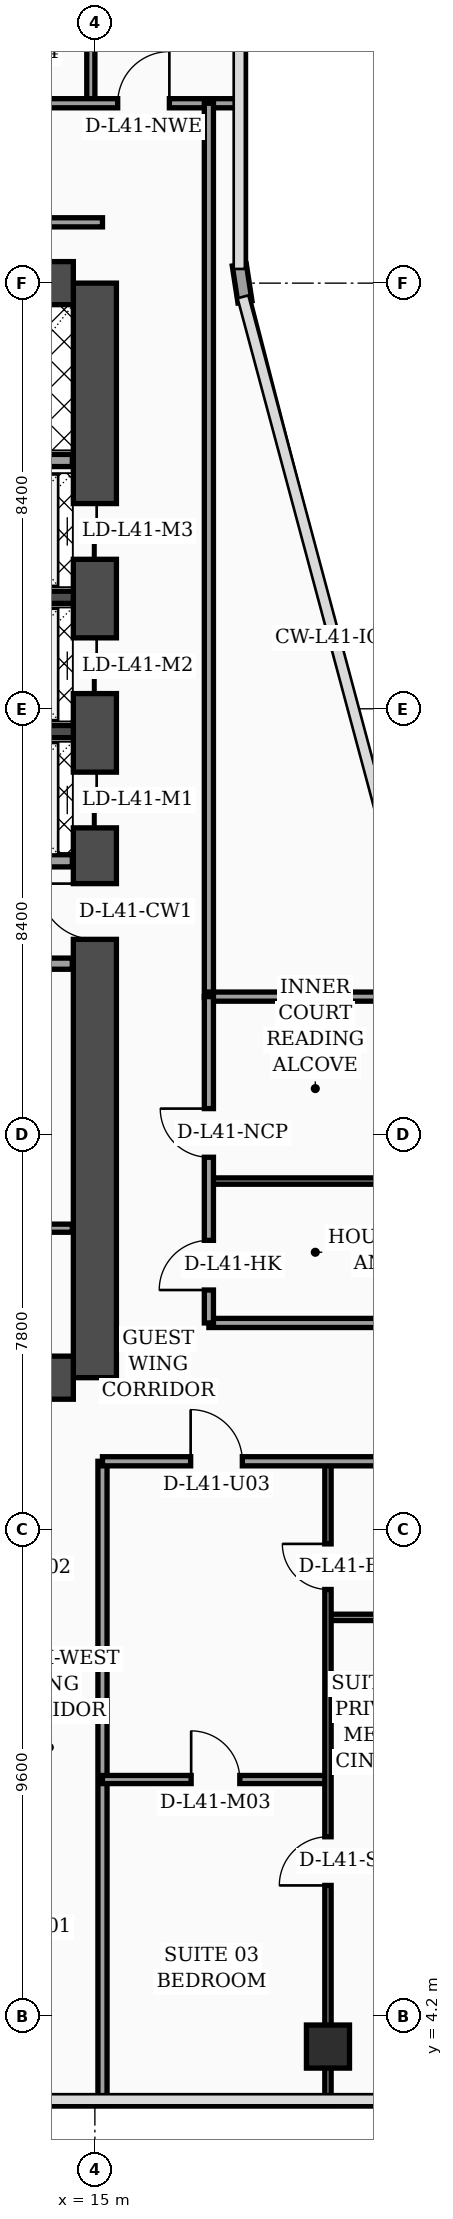
"""IFC4 building model, lengths in metres.
Left out: names, types, materials, properties, quantities, classifications, styles, units other than length and angle.
Written with IfcOpenShell. Run it as: python <this file> out.ifc"""

import sys

from ifc_helpers import new_model, si_unit, direction, frame, frame_2d, origin, origin_2d, place, context, subcontext, project, spatial, rectangle, hollow_rectangle, extrude, element, fill, save


model = new_model("IFC4")
c1 = context("Model", 3, precision=1e-05, world=origin(), true_north=direction((0.0, 1.0)))
c2 = subcontext(c1, "Body", "Model", "MODEL_VIEW")
j1 = project(units=[si_unit("LENGTHUNIT", "METRE"), si_unit("PLANEANGLEUNIT", "RADIAN")], contexts=[c1])
p1 = place(None, origin())
s1 = spatial("IfcSite", under=j1, at=p1, CompositionType="ELEMENT")
p2 = place(p1, origin())
s2 = spatial("IfcBuilding", under=s1, at=p2, CompositionType="ELEMENT")
p3 = place(p2, frame((0.0, 0.0, 167.5)))
s3 = spatial("IfcBuildingStorey", under=s2, at=p3, CompositionType="ELEMENT", Elevation=167.5)
p4 = place(p3, frame((15.0, 16.8, 0.0), z_axis=(0.0, 0.0, 1.0), x_axis=(0.0, 1.0, 0.0)))
e1 = element("IfcWall", 1, at=p4, inside=s3, PredefinedType="SHEAR", context=c2, shape_type="SweptSolid", body=[
    extrude(rectangle(XDim=21.6, YDim=0.85, at=frame_2d((10.8, 0.0))), origin(), (0.0, 0.0, 1.0), 3.56),
])
p5 = place(p4, frame((8.65, 0.0, 0.0)))
e2 = element("IfcOpeningElement", 2, at=p5, cuts=e1, PredefinedType="OPENING", context=c2, shape_type="SweptSolid", body=[
    extrude(rectangle(XDim=1.1, YDim=2.2, at=frame_2d((0.55, 1.1))), frame((0.0, 0.435, 0.0), z_axis=(0.0, -1.0, 0.0), x_axis=(1.0, 0.0, 0.0)), (0.0, 0.0, 1.0), 0.87),
])
p6 = place(p4, frame((10.85, 0.0, 0.0)))
e3 = element("IfcOpeningElement", 3, at=p6, cuts=e1, PredefinedType="OPENING", context=c2, shape_type="SweptSolid", body=[
    extrude(rectangle(XDim=1.1, YDim=2.2, at=frame_2d((0.55, 1.1))), frame((0.0, 0.435, 0.0), z_axis=(0.0, -1.0, 0.0), x_axis=(1.0, 0.0, 0.0)), (0.0, 0.0, 1.0), 0.87),
])
p7 = place(p4, frame((13.5, 0.0, 0.0)))
e4 = element("IfcOpeningElement", 4, at=p7, cuts=e1, PredefinedType="OPENING", context=c2, shape_type="SweptSolid", body=[
    extrude(rectangle(XDim=1.1, YDim=2.2, at=frame_2d((0.55, 1.1))), frame((0.0, 0.435, 0.0), z_axis=(0.0, -1.0, 0.0), x_axis=(1.0, 0.0, 0.0)), (0.0, 0.0, 1.0), 0.87),
])
p8 = place(p4, frame((16.15, 0.0, 0.0)))
e5 = element("IfcOpeningElement", 5, at=p8, cuts=e1, PredefinedType="OPENING", context=c2, shape_type="SweptSolid", body=[
    extrude(rectangle(XDim=1.1, YDim=2.2, at=frame_2d((0.55, 1.1))), frame((0.0, 0.435, 0.0), z_axis=(0.0, -1.0, 0.0), x_axis=(1.0, 0.0, 0.0)), (0.0, 0.0, 1.0), 0.87),
])
for number, where, z_axis, x_axis in (
    (6, (4.625, 38.4, 0.0), (0.0, 0.0, 1.0), (1.0, 0.0, 0.0)),
    (7, (4.625, 16.8, 0.0), (0.0, 0.0, 1.0), (1.0, 0.0, 0.0)),
):
    element("IfcWall", number, at=place(p3, frame(where, z_axis=z_axis, x_axis=x_axis)), inside=s3, PredefinedType="SHEAR", context=c2, shape_type="SweptSolid", body=[
        extrude(rectangle(XDim=9.95, YDim=0.85, at=frame_2d((4.975, 0.0))), origin(), (0.0, 0.0, 1.0), 3.56),
    ])
for number, where, z_axis, x_axis in (
    (8, (12.18, 29.55, 0.0), (0.0, 0.0, 1.0), (1.0, 0.0, 0.0)),
    (9, (12.18, 32.2, 0.0), (0.0, 0.0, 1.0), (1.0, 0.0, 0.0)),
):
    element("IfcWall", number, at=place(p3, frame(where, z_axis=z_axis, x_axis=x_axis)), inside=s3, PredefinedType="SOLIDWALL", context=c2, shape_type="SweptSolid", body=[
        extrude(rectangle(XDim=2.395, YDim=0.24, at=frame_2d((1.198, 0.0))), origin(), (0.0, 0.0, 1.0), 3.56),
    ])
p9 = place(p3, frame((19.6, 3.6, 0.0), z_axis=(0.0, 0.0, 1.0), x_axis=(1.0, 0.0, 0.0)))
e10 = element("IfcColumn", 10, at=p9, inside=s3, PredefinedType="COLUMN", context=c2, shape_type="SweptSolid", body=[
    extrude(hollow_rectangle(XDim=0.85, YDim=0.85, WallThickness=0.036, at=origin_2d()), origin(), (0.0, 0.0, 1.0), 3.56),
])
p10 = place(p3, frame((17.962, 38.03, 0.0), z_axis=(0.0, 0.0, 1.0), x_axis=(-0.15141125477, 0.988470855377, 0.0)))
e11 = element("IfcWall", 11, at=p10, inside=s3, PredefinedType="SOLIDWALL", context=c2, shape_type="SweptSolid", body=[
    extrude(rectangle(XDim=0.739, YDim=0.28, at=frame_2d((0.369, 0.0))), origin(), (0.0, 0.0, 1.0), 3.56),
])
p11 = place(p3, frame((9.68, 19.75, 0.0), z_axis=(0.0, 0.0, 1.0), x_axis=(1.0, 0.0, 0.0)))
e12 = element("IfcWall", 12, at=p11, inside=s3, PredefinedType="PARTITIONING", context=c2, shape_type="SweptSolid", body=[
    extrude(rectangle(XDim=4.875, YDim=0.16, at=frame_2d((2.438, 0.0))), origin(), (0.0, 0.0, 1.0), 3.56),
])
p12 = place(p11, frame((1.1, 0.0, 0.0)))
e13 = element("IfcOpeningElement", 13, at=p12, cuts=e12, PredefinedType="OPENING", context=c2, shape_type="SweptSolid", body=[
    extrude(rectangle(XDim=0.98, YDim=2.15, at=frame_2d((0.49, 1.075))), frame((0.0, 0.09, 0.0), z_axis=(0.0, -1.0, 0.0), x_axis=(1.0, 0.0, 0.0)), (0.0, 0.0, 1.0), 0.18),
])
p13 = place(p3, frame((9.68, 24.97, 0.0), z_axis=(0.0, 0.0, 1.0), x_axis=(1.0, 0.0, 0.0)))
e14 = element("IfcWall", 14, at=p13, inside=s3, PredefinedType="SOLIDWALL", context=c2, shape_type="SweptSolid", body=[
    extrude(rectangle(XDim=4.875, YDim=0.22, at=frame_2d((2.438, 0.0))), origin(), (0.0, 0.0, 1.0), 2.94),
])
p14 = place(p13, frame((0.9, 0.0, 0.0)))
e15 = element("IfcOpeningElement", 15, at=p14, cuts=e14, PredefinedType="OPENING", context=c2, shape_type="SweptSolid", body=[
    extrude(rectangle(XDim=0.98, YDim=2.15, at=frame_2d((0.49, 1.075))), frame((0.0, 0.12, 0.0), z_axis=(0.0, -1.0, 0.0), x_axis=(1.0, 0.0, 0.0)), (0.0, 0.0, 1.0), 0.24),
])
p15 = place(p3, frame((12.25, 27.0, 0.0), z_axis=(0.0, 0.0, 1.0), x_axis=(1.0, 0.0, 0.0)))
e16 = element("IfcWall", 16, at=p15, inside=s3, PredefinedType="SOLIDWALL", context=c2, shape_type="SweptSolid", body=[
    extrude(rectangle(XDim=2.305, YDim=0.24, at=frame_2d((1.152, 0.0))), origin(), (0.0, 0.0, 1.0), 3.56),
])
p16 = place(p3, frame((9.66, 34.9, 0.0), z_axis=(0.0, 0.0, 1.0), x_axis=(1.0, 0.0, 0.0)))
e17 = element("IfcWall", 17, at=p16, inside=s3, PredefinedType="SOLIDWALL", context=c2, shape_type="SweptSolid", body=[
    extrude(rectangle(XDim=4.895, YDim=0.24, at=frame_2d((2.448, 0.0))), origin(), (0.0, 0.0, 1.0), 3.56),
])
p17 = place(p3, frame((15.15, 2.44, 0.0), z_axis=(0.0, 0.0, 1.0), x_axis=(0.0, 1.0, 0.0)))
e18 = element("IfcWall", 18, at=p17, inside=s3, PredefinedType="PARTITIONING", context=c2, shape_type="SweptSolid", body=[
    extrude(rectangle(XDim=12.71, YDim=0.18, at=frame_2d((6.355, 0.0))), origin(), (0.0, 0.0, 1.0), 3.04),
])
p18 = place(p3, frame((19.6, 12.07, 0.0), z_axis=(0.0, 0.0, 1.0), x_axis=(1.0, 0.0, 0.0)))
e19 = element("IfcWall", 19, at=p18, inside=s3, PredefinedType="PARTITIONING", context=c2, shape_type="SweptSolid", body=[
    extrude(rectangle(XDim=2.0, YDim=0.125, at=frame_2d((1.0, 0.0))), origin(), (0.0, 0.0, 1.0), 3.56),
])
p19 = place(p3, frame((15.15, 8.87, 0.0), z_axis=(0.0, 0.0, 1.0), x_axis=(1.0, 0.0, 0.0)))
e20 = element("IfcWall", 20, at=p19, inside=s3, PredefinedType="PARTITIONING", context=c2, shape_type="SweptSolid", body=[
    extrude(rectangle(XDim=4.45, YDim=0.16, at=frame_2d((2.225, 0.0))), origin(), (0.0, 0.0, 1.0), 3.56),
])
p20 = place(p19, frame((1.75, 0.0, 0.0)))
e21 = element("IfcOpeningElement", 21, at=p20, cuts=e20, PredefinedType="OPENING", context=c2, shape_type="SweptSolid", body=[
    extrude(rectangle(XDim=0.96, YDim=2.2, at=frame_2d((0.48, 1.1))), frame((0.0, 0.09, 0.0), z_axis=(0.0, -1.0, 0.0), x_axis=(1.0, 0.0, 0.0)), (0.0, 0.0, 1.0), 0.18),
])
p21 = place(p3, frame((19.6, 2.44, 0.0), z_axis=(0.0, 0.0, 1.0), x_axis=(0.0, 1.0, 0.0)))
e22 = element("IfcWall", 22, at=p21, inside=s3, PredefinedType="PARTITIONING", context=c2, shape_type="SweptSolid", body=[
    extrude(rectangle(XDim=12.71, YDim=0.125, at=frame_2d((6.355, 0.0))), origin(), (0.0, 0.0, 1.0), 2.49),
])
p22 = place(p21, frame((4.34, 0.0, 0.0)))
e23 = element("IfcOpeningElement", 23, at=p22, cuts=e22, PredefinedType="OPENING", context=c2, shape_type="SweptSolid", body=[
    extrude(rectangle(XDim=0.96, YDim=2.2, at=frame_2d((0.48, 1.1))), frame((0.0, 0.073, 0.0), z_axis=(0.0, -1.0, 0.0), x_axis=(1.0, 0.0, 0.0)), (0.0, 0.0, 1.0), 0.145),
])
p23 = place(p21, frame((10.18, 0.0, 0.0)))
e24 = element("IfcOpeningElement", 24, at=p23, cuts=e22, PredefinedType="OPENING", context=c2, shape_type="SweptSolid", body=[
    extrude(rectangle(XDim=0.9, YDim=2.15, at=frame_2d((0.45, 1.075))), frame((0.0, 0.073, 0.0), z_axis=(0.0, -1.0, 0.0), x_axis=(1.0, 0.0, 0.0)), (0.0, 0.0, 1.0), 0.145),
])
p24 = place(p3, frame((15.15, 15.15, 0.0), z_axis=(0.0, 0.0, 1.0), x_axis=(1.0, 0.0, 0.0)))
e25 = element("IfcWall", 25, at=p24, inside=s3, PredefinedType="PARTITIONING", context=c2, shape_type="SweptSolid", body=[
    extrude(rectangle(XDim=6.45, YDim=0.18, at=frame_2d((3.225, 0.0))), origin(), (0.0, 0.0, 1.0), 2.49),
])
p25 = place(p24, frame((1.74, 0.0, 0.0)))
e26 = element("IfcOpeningElement", 26, at=p25, cuts=e25, PredefinedType="OPENING", context=c2, shape_type="SweptSolid", body=[
    extrude(rectangle(XDim=1.02, YDim=2.2, at=frame_2d((0.51, 1.1))), frame((0.0, 0.1, 0.0), z_axis=(0.0, -1.0, 0.0), x_axis=(1.0, 0.0, 0.0)), (0.0, 0.0, 1.0), 0.2),
])
p26 = place(p3, frame((14.92, 41.95, 0.0), z_axis=(0.0, 0.0, 1.0), x_axis=(0.0, 1.0, 0.0)))
e27 = element("IfcWall", 27, at=p26, inside=s3, PredefinedType="PARTITIONING", context=c2, shape_type="SweptSolid", body=[
    extrude(rectangle(XDim=5.85, YDim=0.16, at=frame_2d((2.925, 0.0))), origin(), (0.0, 0.0, 1.0), 3.04),
])
p27 = place(p3, frame((0.08, 41.95, 0.0), z_axis=(0.0, 0.0, 1.0), x_axis=(1.0, 0.0, 0.0)))
e28 = element("IfcWall", 28, at=p27, inside=s3, PredefinedType="PARTITIONING", context=c2, shape_type="SweptSolid", body=[
    extrude(rectangle(XDim=17.77, YDim=0.18, at=frame_2d((8.885, 0.0))), origin(), (0.0, 0.0, 1.0), 2.94),
])
p28 = place(p27, frame((0.9, 0.0, 0.0)))
e29 = element("IfcOpeningElement", 29, at=p28, cuts=e28, PredefinedType="OPENING", context=c2, shape_type="SweptSolid", body=[
    extrude(rectangle(XDim=1.02, YDim=2.2, at=frame_2d((0.51, 1.1))), frame((0.0, 0.1, 0.0), z_axis=(0.0, -1.0, 0.0), x_axis=(1.0, 0.0, 0.0)), (0.0, 0.0, 1.0), 0.2),
])
p29 = place(p27, frame((7.38, 0.0, 0.0)))
e30 = element("IfcOpeningElement", 30, at=p29, cuts=e28, PredefinedType="OPENING", context=c2, shape_type="SweptSolid", body=[
    extrude(rectangle(XDim=1.02, YDim=2.2, at=frame_2d((0.51, 1.1))), frame((0.0, 0.1, 0.0), z_axis=(0.0, -1.0, 0.0), x_axis=(1.0, 0.0, 0.0)), (0.0, 0.0, 1.0), 0.2),
])
p30 = place(p27, frame((15.37, 0.0, 0.0)))
e31 = element("IfcOpeningElement", 31, at=p30, cuts=e28, PredefinedType="OPENING", context=c2, shape_type="SweptSolid", body=[
    extrude(rectangle(XDim=1.02, YDim=2.2, at=frame_2d((0.51, 1.1))), frame((0.0, 0.1, 0.0), z_axis=(0.0, -1.0, 0.0), x_axis=(1.0, 0.0, 0.0)), (0.0, 0.0, 1.0), 0.2),
])
p31 = place(p3, frame((17.25, 24.3, 0.0), z_axis=(0.0, 0.0, 1.0), x_axis=(0.0, 1.0, 0.0)))
e32 = element("IfcWall", 32, at=p31, inside=s3, PredefinedType="PARTITIONING", context=c2, shape_type="SweptSolid", body=[
    extrude(rectangle(XDim=17.65, YDim=0.18, at=frame_2d((8.825, 0.0))), origin(), (0.0, 0.0, 1.0), 2.94),
])
p32 = place(p3, frame((3.755, 39.6, 0.0), z_axis=(0.0, 0.0, 1.0), x_axis=(1.0, 0.0, 0.0)))
e33 = element("IfcWall", 33, at=p32, inside=s3, PredefinedType="PARTITIONING", context=c2, shape_type="SweptSolid", body=[
    extrude(rectangle(XDim=11.395, YDim=0.18, at=frame_2d((5.698, 0.0))), origin(), (0.0, 0.0, 1.0), 2.94),
])
p33 = place(p3, frame((17.25, 17.88, 0.0), z_axis=(0.0, 0.0, 1.0), x_axis=(1.0, 0.0, 0.0)))
e34 = element("IfcWall", 34, at=p33, inside=s3, PredefinedType="PARTITIONING", context=c2, shape_type="SweptSolid", body=[
    extrude(rectangle(XDim=4.3, YDim=0.18, at=frame_2d((2.15, 0.0))), origin(), (0.0, 0.0, 1.0), 3.56),
])
p34 = place(p3, frame((17.25, 20.68, 0.0), z_axis=(0.0, 0.0, 1.0), x_axis=(1.0, 0.0, 0.0)))
e35 = element("IfcWall", 35, at=p34, inside=s3, PredefinedType="PARTITIONING", context=c2, shape_type="SweptSolid", body=[
    extrude(rectangle(XDim=4.3, YDim=0.125, at=frame_2d((2.15, 0.0))), origin(), (0.0, 0.0, 1.0), 3.56),
])
p35 = place(p3, frame((17.25, 24.32, 0.0), z_axis=(0.0, 0.0, 1.0), x_axis=(1.0, 0.0, 0.0)))
e36 = element("IfcWall", 36, at=p35, inside=s3, PredefinedType="PARTITIONING", context=c2, shape_type="SweptSolid", body=[
    extrude(rectangle(XDim=4.35, YDim=0.18, at=frame_2d((2.175, 0.0))), origin(), (0.0, 0.0, 1.0), 3.56),
])
p36 = place(p3, frame((17.25, 17.88, 0.0), z_axis=(0.0, 0.0, 1.0), x_axis=(0.0, 1.0, 0.0)))
e37 = element("IfcWall", 37, at=p36, inside=s3, PredefinedType="PARTITIONING", context=c2, shape_type="SweptSolid", body=[
    extrude(rectangle(XDim=6.44, YDim=0.18, at=frame_2d((3.22, 0.0))), origin(), (0.0, 0.0, 1.0), 3.56),
])
p37 = place(p36, frame((0.65, 0.0, 0.0)))
e38 = element("IfcOpeningElement", 38, at=p37, cuts=e37, PredefinedType="OPENING", context=c2, shape_type="SweptSolid", body=[
    extrude(rectangle(XDim=0.98, YDim=2.15, at=frame_2d((0.49, 1.075))), frame((0.0, 0.1, 0.0), z_axis=(0.0, -1.0, 0.0), x_axis=(1.0, 0.0, 0.0)), (0.0, 0.0, 1.0), 0.2),
])
p38 = place(p36, frame((3.27, 0.0, 0.0)))
e39 = element("IfcOpeningElement", 39, at=p38, cuts=e37, PredefinedType="OPENING", context=c2, shape_type="SweptSolid", body=[
    extrude(rectangle(XDim=0.96, YDim=2.2, at=frame_2d((0.48, 1.1))), frame((0.0, 0.1, 0.0), z_axis=(0.0, -1.0, 0.0), x_axis=(1.0, 0.0, 0.0)), (0.0, 0.0, 1.0), 0.2),
])
p39 = place(p20, origin())
e40 = element("IfcDoor", 40, at=p39, inside=s3, OperationType="SINGLE_SWING_LEFT", PredefinedType="DOOR", context=c2, shape_type="SweptSolid", body=[
    extrude(rectangle(XDim=0.96, YDim=2.2, at=frame_2d((0.48, 1.1))), frame((0.0, 0.025, 0.0), z_axis=(0.0, -1.0, 0.0), x_axis=(1.0, 0.0, 0.0)), (0.0, 0.0, 1.0), 0.05),
])
fill(e21, e40)
p40 = place(p22, origin())
e41 = element("IfcDoor", 41, at=p40, inside=s3, OperationType="SINGLE_SWING_LEFT", PredefinedType="DOOR", context=c2, shape_type="SweptSolid", body=[
    extrude(rectangle(XDim=0.96, YDim=2.2, at=frame_2d((0.48, 1.1))), frame((0.0, 0.025, 0.0), z_axis=(0.0, -1.0, 0.0), x_axis=(1.0, 0.0, 0.0)), (0.0, 0.0, 1.0), 0.05),
])
fill(e23, e41)
p41 = place(p23, origin())
e42 = element("IfcDoor", 42, at=p41, inside=s3, OperationType="SINGLE_SWING_RIGHT", PredefinedType="DOOR", context=c2, shape_type="SweptSolid", body=[
    extrude(rectangle(XDim=0.9, YDim=2.15, at=frame_2d((0.45, 1.075))), frame((0.0, 0.025, 0.0), z_axis=(0.0, -1.0, 0.0), x_axis=(1.0, 0.0, 0.0)), (0.0, 0.0, 1.0), 0.05),
])
fill(e24, e42)
p42 = place(p25, origin())
e43 = element("IfcDoor", 43, at=p42, inside=s3, OperationType="SINGLE_SWING_LEFT", PredefinedType="DOOR", context=c2, shape_type="SweptSolid", body=[
    extrude(rectangle(XDim=1.02, YDim=2.2, at=frame_2d((0.51, 1.1))), frame((0.0, 0.025, 0.0), z_axis=(0.0, -1.0, 0.0), x_axis=(1.0, 0.0, 0.0)), (0.0, 0.0, 1.0), 0.05),
])
fill(e26, e43)
p43 = place(p30, origin())
e44 = element("IfcDoor", 44, at=p43, inside=s3, OperationType="SINGLE_SWING_RIGHT", PredefinedType="DOOR", context=c2, shape_type="SweptSolid", body=[
    extrude(rectangle(XDim=1.02, YDim=2.2, at=frame_2d((0.51, 1.1))), frame((0.0, 0.025, 0.0), z_axis=(0.0, -1.0, 0.0), x_axis=(1.0, 0.0, 0.0)), (0.0, 0.0, 1.0), 0.05),
])
fill(e31, e44)
p44 = place(p37, origin())
e45 = element("IfcDoor", 45, at=p44, inside=s3, OperationType="SINGLE_SWING_LEFT", PredefinedType="DOOR", context=c2, shape_type="SweptSolid", body=[
    extrude(rectangle(XDim=0.98, YDim=2.15, at=frame_2d((0.49, 1.075))), frame((0.0, 0.025, 0.0), z_axis=(0.0, -1.0, 0.0), x_axis=(1.0, 0.0, 0.0)), (0.0, 0.0, 1.0), 0.05),
])
fill(e38, e45)
p45 = place(p38, origin())
e46 = element("IfcDoor", 46, at=p45, inside=s3, OperationType="SINGLE_SWING_RIGHT", PredefinedType="DOOR", context=c2, shape_type="SweptSolid", body=[
    extrude(rectangle(XDim=0.96, YDim=2.2, at=frame_2d((0.48, 1.1))), frame((0.0, 0.025, 0.0), z_axis=(0.0, -1.0, 0.0), x_axis=(1.0, 0.0, 0.0)), (0.0, 0.0, 1.0), 0.05),
])
fill(e39, e46)
p46 = place(p5, origin())
e47 = element("IfcDoor", 47, at=p46, inside=s3, OperationType="SINGLE_SWING_RIGHT", PredefinedType="DOOR", context=c2, shape_type="SweptSolid", body=[
    extrude(rectangle(XDim=1.1, YDim=2.2, at=frame_2d((0.55, 1.1))), frame((0.0, 0.025, 0.0), z_axis=(0.0, -1.0, 0.0), x_axis=(1.0, 0.0, 0.0)), (0.0, 0.0, 1.0), 0.05),
])
fill(e2, e47)
p47 = place(p6, origin())
e48 = element("IfcDoor", 48, at=p47, inside=s3, OperationType="DOUBLE_DOOR_SLIDING", PredefinedType="DOOR", context=c2, shape_type="SweptSolid", body=[
    extrude(rectangle(XDim=1.1, YDim=2.2, at=frame_2d((0.55, 1.1))), frame((0.0, 0.025, 0.0), z_axis=(0.0, -1.0, 0.0), x_axis=(1.0, 0.0, 0.0)), (0.0, 0.0, 1.0), 0.05),
])
fill(e3, e48)
p48 = place(p7, origin())
e49 = element("IfcDoor", 49, at=p48, inside=s3, OperationType="DOUBLE_DOOR_SLIDING", PredefinedType="DOOR", context=c2, shape_type="SweptSolid", body=[
    extrude(rectangle(XDim=1.1, YDim=2.2, at=frame_2d((0.55, 1.1))), frame((0.0, 0.025, 0.0), z_axis=(0.0, -1.0, 0.0), x_axis=(1.0, 0.0, 0.0)), (0.0, 0.0, 1.0), 0.05),
])
fill(e4, e49)
p49 = place(p8, origin())
e50 = element("IfcDoor", 50, at=p49, inside=s3, OperationType="DOUBLE_DOOR_SLIDING", PredefinedType="DOOR", context=c2, shape_type="SweptSolid", body=[
    extrude(rectangle(XDim=1.1, YDim=2.2, at=frame_2d((0.55, 1.1))), frame((0.0, 0.025, 0.0), z_axis=(0.0, -1.0, 0.0), x_axis=(1.0, 0.0, 0.0)), (0.0, 0.0, 1.0), 0.05),
])
fill(e5, e50)
save(model, sys.argv[1])
